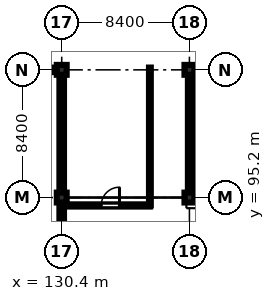
"""IFC4 building model, lengths in metres.
Left out: names, types, materials, properties, quantities, classifications, styles, units other than length and angle.
Written with IfcOpenShell. Run it as: python <this file> out.ifc"""

import sys

from ifc_helpers import new_model, si_unit, direction, frame, frame_2d, origin, origin_2d, place, context, subcontext, project, spatial, rectangle, extrude, element, fill, save


model = new_model("IFC4")
c1 = context("Model", 3, precision=1e-05, world=origin(), true_north=direction((0.0, 1.0)))
c2 = subcontext(c1, "Body", "Model", "MODEL_VIEW")
j1 = project(units=[si_unit("LENGTHUNIT", "METRE"), si_unit("PLANEANGLEUNIT", "RADIAN")], contexts=[c1])
p1 = place(None, origin())
s1 = spatial("IfcSite", under=j1, at=p1, CompositionType="ELEMENT")
p2 = place(p1, origin())
s2 = spatial("IfcBuilding", under=s1, at=p2, CompositionType="ELEMENT")
p3 = place(p2, frame((0.0, 0.0, 65.7)))
s3 = spatial("IfcBuildingStorey", under=s2, at=p3, CompositionType="ELEMENT", Elevation=65.7)
for number, where, z_axis, x_axis in (
    (1, (130.4, 95.2, 0.0), (0.0, 0.0, 1.0), (1.0, 0.0, 0.0)),
    (2, (130.4, 103.6, 0.0), (0.0, 0.0, 1.0), (1.0, 0.0, 0.0)),
    (3, (138.8, 95.2, 0.0), (0.0, 0.0, 1.0), (1.0, 0.0, 0.0)),
    (4, (138.8, 103.6, 0.0), (0.0, 0.0, 1.0), (1.0, 0.0, 0.0)),
):
    element("IfcColumn", number, at=place(p3, frame(where, z_axis=z_axis, x_axis=x_axis)), inside=s3, PredefinedType="COLUMN", context=c2, shape_type="SweptSolid", body=[
        extrude(rectangle(XDim=0.65, YDim=0.65, at=origin_2d()), origin(), (0.0, 0.0, 1.0), 4.3),
    ])
for number, where, z_axis, x_axis in (
    (5, (138.7, 95.275, 0.0), (0.0, 0.0, 1.0), (1.0, 0.0, 0.0)),
    (6, (138.7, 103.525, 0.0), (0.0, 0.0, 1.0), (1.0, 0.0, 0.0)),
):
    element("IfcWall", number, at=place(p3, frame(where, z_axis=z_axis, x_axis=x_axis)), inside=s3, PredefinedType="SHEAR", context=c2, shape_type="SweptSolid", body=[
        extrude(rectangle(XDim=3.8, YDim=0.35, at=frame_2d((1.9, 0.0))), origin(), (0.0, 0.0, 1.0), 4.3),
    ])
p4 = place(p3, frame((138.875, 95.45, 0.0), z_axis=(0.0, 0.0, 1.0), x_axis=(0.0, 1.0, 0.0)))
e7 = element("IfcWall", 7, at=p4, inside=s3, PredefinedType="SHEAR", context=c2, shape_type="SweptSolid", body=[
    extrude(rectangle(XDim=7.9, YDim=0.35, at=frame_2d((3.95, 0.0))), origin(), (0.0, 0.0, 1.0), 4.3),
])
p5 = place(p3, frame((130.4, 92.15, 0.0), z_axis=(0.0, 0.0, 1.0), x_axis=(0.0, 1.0, 0.0)))
e8 = element("IfcWall", 8, at=p5, inside=s3, PredefinedType="STANDARD", context=c2, shape_type="SweptSolid", body=[
    extrude(rectangle(XDim=2.725, YDim=0.3, at=frame_2d((1.363, 0.0))), origin(), (0.0, 0.0, 1.0), 4.3),
])
p6 = place(p3, frame((130.4, 95.525, 0.0), z_axis=(0.0, 0.0, 1.0), x_axis=(0.0, 1.0, 0.0)))
e9 = element("IfcWall", 9, at=p6, inside=s3, PredefinedType="STANDARD", context=c2, shape_type="SweptSolid", body=[
    extrude(rectangle(XDim=7.75, YDim=0.3, at=frame_2d((3.875, 0.0))), origin(), (0.0, 0.0, 1.0), 3.7),
])
p7 = place(p6, frame((2.4, 0.0, 1.0)))
e10 = element("IfcOpeningElement", 10, at=p7, cuts=e9, PredefinedType="OPENING", context=c2, shape_type="SweptSolid", body=[
    extrude(rectangle(XDim=1.8, YDim=1.8, at=frame_2d((0.9, 0.9))), frame((0.0, 0.16, 0.0), z_axis=(0.0, -1.0, 0.0), x_axis=(1.0, 0.0, 0.0)), (0.0, 0.0, 1.0), 0.32),
])
p8 = place(p3, frame((130.075, 103.6, 0.0), z_axis=(0.0, 0.0, 1.0), x_axis=(-1.0, 0.0, 0.0)))
e11 = element("IfcWall", 11, at=p8, inside=s3, PredefinedType="STANDARD", context=c2, shape_type="SweptSolid", body=[
    extrude(rectangle(XDim=7.7, YDim=0.3, at=frame_2d((3.85, 0.0))), origin(), (0.0, 0.0, 1.0), 3.7),
])
p9 = place(p3, frame((121.885, 103.6, 4.5), z_axis=(0.0, 0.0, 1.0), x_axis=(1.0, 0.0, 0.0)))
e12 = element("IfcWall", 12, at=p9, inside=s3, PredefinedType="PARAPET", context=c2, shape_type="SweptSolid", body=[
    extrude(rectangle(XDim=8.63, YDim=0.23, at=frame_2d((4.315, 0.0))), origin(), (0.0, 0.0, 1.0), 1.35),
])
p10 = place(p3, frame((130.4, 103.485, 4.5), z_axis=(0.0, 0.0, 1.0), x_axis=(0.0, -1.0, 0.0)))
e13 = element("IfcWall", 13, at=p10, inside=s3, PredefinedType="PARAPET", context=c2, shape_type="SweptSolid", body=[
    extrude(rectangle(XDim=11.37, YDim=0.23, at=frame_2d((5.685, 0.0))), origin(), (0.0, 0.0, 1.0), 1.35),
])
p11 = place(p3, frame((136.2, 94.68, 0.0), z_axis=(0.0, 0.0, 1.0), x_axis=(0.0, 1.0, 0.0)))
e14 = element("IfcWall", 14, at=p11, inside=s3, PredefinedType="PARTITIONING", context=c2, shape_type="SweptSolid", body=[
    extrude(rectangle(XDim=9.07, YDim=0.12, at=frame_2d((4.535, 0.0))), origin(), (0.0, 0.0, 1.0), 4.3),
])
p12 = place(p3, frame((130.8, 94.68, 0.0), z_axis=(0.0, 0.0, 1.0), x_axis=(1.0, 0.0, 0.0)))
e15 = element("IfcWall", 15, at=p12, inside=s3, PredefinedType="PARTITIONING", context=c2, shape_type="SweptSolid", body=[
    extrude(rectangle(XDim=5.4, YDim=0.145, at=frame_2d((2.7, 0.0))), origin(), (0.0, 0.0, 1.0), 4.3),
])
p13 = place(p12, frame((2.2, 0.0, 0.0)))
e16 = element("IfcOpeningElement", 16, at=p13, cuts=e15, PredefinedType="OPENING", context=c2, shape_type="SweptSolid", body=[
    extrude(rectangle(XDim=1.2, YDim=2.2, at=frame_2d((0.6, 1.1))), frame((0.0, 0.083, 0.0), z_axis=(0.0, -1.0, 0.0), x_axis=(1.0, 0.0, 0.0)), (0.0, 0.0, 1.0), 0.165),
])
p14 = place(p7, origin())
e17 = element("IfcWindow", 17, at=p14, inside=s3, PartitioningType="DOUBLE_PANEL_VERTICAL", PredefinedType="WINDOW", context=c2, shape_type="SweptSolid", body=[
    extrude(rectangle(XDim=1.8, YDim=1.8, at=frame_2d((0.9, 0.9))), frame((0.0, 0.03, 0.0), z_axis=(0.0, -1.0, 0.0), x_axis=(1.0, 0.0, 0.0)), (0.0, 0.0, 1.0), 0.06),
])
fill(e10, e17)
p15 = place(p13, origin())
e18 = element("IfcDoor", 18, at=p15, inside=s3, OperationType="SINGLE_SWING_RIGHT", PredefinedType="DOOR", context=c2, shape_type="SweptSolid", body=[
    extrude(rectangle(XDim=1.2, YDim=2.2, at=frame_2d((0.6, 1.1))), frame((0.0, 0.025, 0.0), z_axis=(0.0, -1.0, 0.0), x_axis=(1.0, 0.0, 0.0)), (0.0, 0.0, 1.0), 0.05),
])
fill(e16, e18)
save(model, sys.argv[1])
